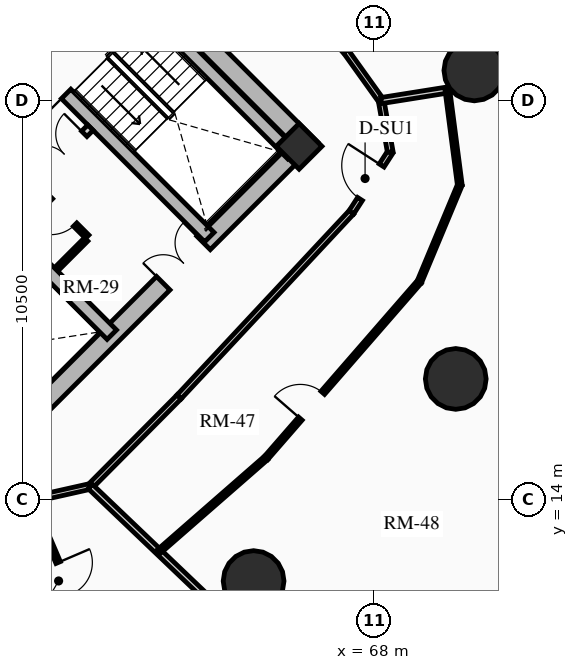
"""IFC4 building model, lengths in metres.
Left out: names, types, materials, properties, quantities, classifications, styles, units other than length and angle.
Written with IfcOpenShell. Run it as: python <this file> out.ifc"""

import sys

from ifc_helpers import new_model, si_unit, direction, frame, frame_2d, origin, origin_2d, place, context, subcontext, project, spatial, rectangle, circle, extrude, source, transform, mapped, element, fill, save


model = new_model("IFC4")
c1 = context("Model", 3, precision=1e-05, world=origin(), true_north=direction((0.0, 1.0)))
c2 = subcontext(c1, "Body", "Model", "MODEL_VIEW")
j1 = project(units=[si_unit("LENGTHUNIT", "METRE"), si_unit("PLANEANGLEUNIT", "RADIAN")], contexts=[c1])
p1 = place(None, origin())
s1 = spatial("IfcSite", under=j1, at=p1, CompositionType="ELEMENT")
p2 = place(p1, origin())
s2 = spatial("IfcBuilding", under=s1, at=p2, CompositionType="ELEMENT")
p3 = place(p2, frame((0.0, 0.0, 51.1)))
s3 = spatial("IfcBuildingStorey", under=s2, at=p3, CompositionType="ELEMENT", Elevation=51.1)
p4 = place(p3, frame((66.339, 23.227, 0.0), z_axis=(0.0, 0.0, 1.0), x_axis=(-0.707106781187, 0.707106781187, 0.0)))
e1 = element("IfcWall", 1, at=p4, inside=s3, PredefinedType="SHEAR", context=c2, shape_type="SweptSolid", body=[
    extrude(rectangle(XDim=14.3, YDim=0.5, at=frame_2d((7.15, 0.0))), origin(), (0.0, 0.0, 1.0), 2.91),
])
p5 = place(p3, frame((58.596, 15.838, 0.0), z_axis=(0.0, 0.0, 1.0), x_axis=(0.707106781187, 0.707106781187, 0.0)))
e2 = element("IfcWall", 2, at=p5, inside=s3, PredefinedType="SHEAR", context=c2, shape_type="SweptSolid", body=[
    extrude(rectangle(XDim=10.7, YDim=0.5, at=frame_2d((5.35, 0.0))), origin(), (0.0, 0.0, 1.0), 2.91),
])
m1 = source(origin(), c2, "Body", "SweptSolid", [
    extrude(rectangle(XDim=1.5, YDim=2.02, at=frame_2d((0.75, 1.01))), frame((0.0, 0.26, 0.0), z_axis=(0.0, -1.0, 0.0), x_axis=(1.0, 0.0, 0.0)), (0.0, 0.0, 1.0), 0.52),
])
p6 = place(p5, frame((5.45, 0.0, 0.0)))
e3 = element("IfcOpeningElement", 3, at=p6, cuts=e2, PredefinedType="OPENING", context=c2, shape_type="MappedRepresentation", body=[
    mapped(m1, transform((0.0, 0.0, 0.0), x_axis=(1.0, 0.0, 0.0), y_axis=(0.0, 1.0, 0.0), z_axis=(0.0, 0.0, 1.0), scale=1.0)),
])
p7 = place(p3, frame((61.096, 18.338, 0.0), z_axis=(0.0, 0.0, 1.0), x_axis=(-0.707106781187, 0.707106781187, 0.0)))
e4 = element("IfcWall", 4, at=p7, inside=s3, PredefinedType="SHEAR", context=c2, shape_type="SweptSolid", body=[
    extrude(rectangle(XDim=13.8, YDim=0.35, at=frame_2d((6.9, 0.0))), origin(), (0.0, 0.0, 1.0), 2.91),
])
m2 = source(origin(), c2, "Body", "SweptSolid", [
    extrude(rectangle(XDim=1.1, YDim=2.015, at=frame_2d((0.55, 1.007))), frame((0.0, 0.185, 0.0), z_axis=(0.0, -1.0, 0.0), x_axis=(1.0, 0.0, 0.0)), (0.0, 0.0, 1.0), 0.37),
])
p8 = place(p7, frame((4.9, 0.0, 0.0)))
e5 = element("IfcOpeningElement", 5, at=p8, cuts=e4, PredefinedType="OPENING", context=c2, shape_type="MappedRepresentation", body=[
    mapped(m2, transform((0.0, 0.0, 0.0), x_axis=(1.0, 0.0, 0.0), y_axis=(0.0, 1.0, 0.0), z_axis=(0.0, 0.0, 1.0), scale=1.0)),
])
m3 = source(origin(), c2, "Body", "SweptSolid", [
    extrude(rectangle(XDim=1.15, YDim=2.02, at=frame_2d((0.575, 1.01))), frame((0.0, 0.185, 0.0), z_axis=(0.0, -1.0, 0.0), x_axis=(1.0, 0.0, 0.0)), (0.0, 0.0, 1.0), 0.37),
])
p9 = place(p7, frame((7.32, 0.0, 0.0)))
e6 = element("IfcOpeningElement", 6, at=p9, cuts=e4, PredefinedType="OPENING", context=c2, shape_type="MappedRepresentation", body=[
    mapped(m3, transform((0.0, 0.0, 0.0), x_axis=(1.0, 0.0, 0.0), y_axis=(0.0, 1.0, 0.0), z_axis=(0.0, 0.0, 1.0), scale=1.0)),
])
p10 = place(p3, frame((63.662, 20.904, 0.0), z_axis=(0.0, 0.0, 1.0), x_axis=(-0.707106781187, 0.707106781187, 0.0)))
e7 = element("IfcWall", 7, at=p10, inside=s3, PredefinedType="SHEAR", context=c2, shape_type="SweptSolid", body=[
    extrude(rectangle(XDim=13.8, YDim=0.35, at=frame_2d((6.9, 0.0))), origin(), (0.0, 0.0, 1.0), 2.91),
])
p11 = place(p10, frame((10.025, 0.0, 0.0)))
e8 = element("IfcOpeningElement", 8, at=p11, cuts=e7, PredefinedType="OPENING", context=c2, shape_type="MappedRepresentation", body=[
    mapped(m2, transform((0.0, 0.0, 0.0), x_axis=(1.0, 0.0, 0.0), y_axis=(0.0, 1.0, 0.0), z_axis=(0.0, 0.0, 1.0), scale=1.0)),
])
p12 = place(p10, frame((12.025, 0.0, 0.0)))
e9 = element("IfcOpeningElement", 9, at=p12, cuts=e7, PredefinedType="OPENING", context=c2, shape_type="MappedRepresentation", body=[
    mapped(m2, transform((0.0, 0.0, 0.0), x_axis=(1.0, 0.0, 0.0), y_axis=(0.0, 1.0, 0.0), z_axis=(0.0, 0.0, 1.0), scale=1.0)),
])
p13 = place(p10, frame((5.33, 0.0, 0.0)))
e10 = element("IfcOpeningElement", 10, at=p13, cuts=e7, PredefinedType="OPENING", context=c2, shape_type="MappedRepresentation", body=[
    mapped(m3, transform((0.0, 0.0, 0.0), x_axis=(1.0, 0.0, 0.0), y_axis=(0.0, 1.0, 0.0), z_axis=(0.0, 0.0, 1.0), scale=1.0)),
])
p14 = place(p3, frame((65.847, 23.089, 0.0), z_axis=(0.0, 0.0, 1.0), x_axis=(-0.707106781187, 0.707106781187, 0.0)))
e11 = element("IfcWall", 11, at=p14, inside=s3, PredefinedType="SHEAR", context=c2, shape_type="SweptSolid", body=[
    extrude(rectangle(XDim=6.745, YDim=0.35, at=frame_2d((3.373, 0.0))), origin(), (0.0, 0.0, 1.0), 2.91),
])
p15 = place(p3, frame((58.893, 25.674, 0.0), z_axis=(0.0, 0.0, 1.0), x_axis=(0.707106781187, 0.707106781187, 0.0)))
e12 = element("IfcWall", 12, at=p15, inside=s3, PredefinedType="SHEAR", context=c2, shape_type="SweptSolid", body=[
    extrude(rectangle(XDim=3.285, YDim=0.35, at=frame_2d((1.643, 0.0))), origin(), (0.0, 0.0, 1.0), 2.91),
])
p16 = place(p3, frame((66.024, 23.294, 0.0), z_axis=(0.0, 0.0, 1.0), x_axis=(0.707106781187, 0.707106781187, 0.0)))
e13 = element("IfcColumn", 13, at=p16, inside=s3, PredefinedType="COLUMN", context=c2, shape_type="SweptSolid", body=[
    extrude(rectangle(XDim=0.85, YDim=0.85, at=origin_2d()), origin(), (0.0, 0.0, 1.0), 2.91),
])
for number, where, z_axis, x_axis in (
    (14, (64.827, 11.854, 0.0), (0.0, 0.0, 1.0), (1.0, 0.0, 0.0)),
    (15, (70.146, 17.173, 0.0), (0.0, 0.0, 1.0), (1.0, 0.0, 0.0)),
    (16, (70.635, 25.291, 0.0), (0.0, 0.0, 1.0), (1.0, 0.0, 0.0)),
):
    element("IfcColumn", number, at=place(p3, frame(where, z_axis=z_axis, x_axis=x_axis)), inside=s3, PredefinedType="USERDEFINED", context=c2, shape_type="SweptSolid", body=[
        extrude(circle(Radius=0.8, at=origin_2d()), origin(), (0.0, 0.0, 1.0), 2.91),
    ])
p17 = place(p3, frame((73.814, 15.031, 0.0), z_axis=(0.0, 0.0, 1.0), x_axis=(-0.559638693991, -0.828736708604, 0.0)))
e17 = element("IfcWall", 17, at=p17, inside=s3, PredefinedType="SOLIDWALL", context=c2, shape_type="SweptSolid", body=[
    extrude(rectangle(XDim=4.93, YDim=0.24, at=frame_2d((2.465, 0.0))), origin(), (0.0, 0.0, 1.0), 2.073),
])
m4 = source(origin(), c2, "Body", "SweptSolid", [
    extrude(rectangle(XDim=2.2, YDim=1.35, at=frame_2d((1.1, 0.675))), frame((0.0, 0.13, 0.0), z_axis=(0.0, -1.0, 0.0), x_axis=(1.0, 0.0, 0.0)), (0.0, 0.0, 1.0), 0.26),
])
p18 = place(p17, frame((1.365, 0.0, 0.65)))
e18 = element("IfcOpeningElement", 18, at=p18, cuts=e17, PredefinedType="OPENING", context=c2, shape_type="MappedRepresentation", body=[
    mapped(m4, transform((0.0, 0.0, 0.0), x_axis=(1.0, 0.0, 0.0), y_axis=(0.0, 1.0, 0.0), z_axis=(0.0, 0.0, 1.0), scale=1.0)),
])
p19 = place(p3, frame((58.214, 21.467, 0.0), z_axis=(0.0, 0.0, 1.0), x_axis=(0.707106781187, 0.707106781187, 0.0)))
e19 = element("IfcWall", 19, at=p19, inside=s3, PredefinedType="PARTITIONING", context=c2, shape_type="SweptSolid", body=[
    extrude(rectangle(XDim=3.28, YDim=0.2, at=frame_2d((1.64, 0.0))), origin(), (0.0, 0.0, 1.0), 2.635),
])
m5 = source(origin(), c2, "Body", "SweptSolid", [
    extrude(rectangle(XDim=1.5, YDim=2.02, at=frame_2d((0.75, 1.01))), frame((0.0, 0.11, 0.0), z_axis=(0.0, -1.0, 0.0), x_axis=(1.0, 0.0, 0.0)), (0.0, 0.0, 1.0), 0.22),
])
p20 = place(p19, frame((1.55, 0.0, 0.0)))
e20 = element("IfcOpeningElement", 20, at=p20, cuts=e19, PredefinedType="OPENING", context=c2, shape_type="MappedRepresentation", body=[
    mapped(m5, transform((0.0, 0.0, 0.0), x_axis=(1.0, 0.0, 0.0), y_axis=(0.0, 1.0, 0.0), z_axis=(0.0, 0.0, 1.0), scale=1.0)),
])
p21 = place(p3, frame((60.448, 20.915, 0.0), z_axis=(0.0, 0.0, 1.0), x_axis=(-0.707106781187, 0.707106781187, 0.0)))
e21 = element("IfcWall", 21, at=p21, inside=s3, PredefinedType="PARTITIONING", context=c2, shape_type="SweptSolid", body=[
    extrude(rectangle(XDim=1.87, YDim=0.125, at=frame_2d((0.935, 0.0))), origin(), (0.0, 0.0, 1.0), 2.635),
])
m6 = source(origin(), c2, "Body", "SweptSolid", [
    extrude(rectangle(XDim=0.9, YDim=2.005, at=frame_2d((0.45, 1.002))), frame((0.0, 0.073, 0.0), z_axis=(0.0, -1.0, 0.0), x_axis=(1.0, 0.0, 0.0)), (0.0, 0.0, 1.0), 0.145),
])
p22 = place(p21, frame((0.45, 0.0, 0.0)))
e22 = element("IfcOpeningElement", 22, at=p22, cuts=e21, PredefinedType="OPENING", context=c2, shape_type="MappedRepresentation", body=[
    mapped(m6, transform((0.0, 0.0, 0.0), x_axis=(1.0, 0.0, 0.0), y_axis=(0.0, 1.0, 0.0), z_axis=(0.0, 0.0, 1.0), scale=1.0)),
])
p23 = place(p3, frame((59.643, 20.066, 0.0), z_axis=(0.0, 0.0, 1.0), x_axis=(0.707106781187, 0.707106781187, 0.0)))
e23 = element("IfcWall", 23, at=p23, inside=s3, PredefinedType="PARTITIONING", context=c2, shape_type="SweptSolid", body=[
    extrude(rectangle(XDim=1.1, YDim=0.125, at=frame_2d((0.55, 0.0))), origin(), (0.0, 0.0, 1.0), 2.635),
])
p24 = place(p3, frame((58.975, 13.996, 0.0), z_axis=(0.0, 0.0, 1.0), x_axis=(0.975700857392, 0.219106907431, 0.0)))
e24 = element("IfcWall", 24, at=p24, inside=s3, PredefinedType="PARTITIONING", context=c2, shape_type="SweptSolid", body=[
    extrude(rectangle(XDim=1.591, YDim=0.15, at=frame_2d((0.795, 0.0))), origin(), (0.0, 0.0, 1.0), 2.205),
])
p25 = place(p3, frame((60.528, 14.344, 0.0), z_axis=(0.0, 0.0, 1.0), x_axis=(0.704381645997, 0.709821454158, 0.0)))
e25 = element("IfcWall", 25, at=p25, inside=s3, PredefinedType="PARTITIONING", context=c2, shape_type="SweptSolid", body=[
    extrude(rectangle(XDim=3.321, YDim=0.15, at=frame_2d((1.661, 0.0))), origin(), (0.0, 0.0, 1.0), 2.159),
])
p26 = place(p3, frame((62.867, 16.702, 0.0), z_axis=(0.0, 0.0, 1.0), x_axis=(0.682449206191, 0.73093302085, 0.0)))
e26 = element("IfcWall", 26, at=p26, inside=s3, PredefinedType="PARTITIONING", context=c2, shape_type="SweptSolid", body=[
    extrude(rectangle(XDim=6.642, YDim=0.15, at=frame_2d((3.321, 0.0))), origin(), (0.0, 0.0, 1.0), 2.159),
])
p27 = place(p3, frame((67.4, 21.556, 0.0), z_axis=(0.0, 0.0, 1.0), x_axis=(0.542247692187, 0.840218686009, 0.0)))
e27 = element("IfcWall", 27, at=p27, inside=s3, PredefinedType="PARTITIONING", context=c2, shape_type="SweptSolid", body=[
    extrude(rectangle(XDim=1.887, YDim=0.15, at=frame_2d((0.943, 0.0))), origin(), (0.0, 0.0, 1.0), 2.205),
])
m7 = source(origin(), c2, "Body", "SweptSolid", [
    extrude(rectangle(XDim=1.05, YDim=2.015, at=frame_2d((0.525, 1.007))), frame((0.0, 0.085, 0.0), z_axis=(0.0, -1.0, 0.0), x_axis=(1.0, 0.0, 0.0)), (0.0, 0.0, 1.0), 0.17),
])
p28 = place(p27, frame((0.419, 0.0, 0.0)))
e28 = element("IfcOpeningElement", 28, at=p28, cuts=e27, PredefinedType="OPENING", context=c2, shape_type="MappedRepresentation", body=[
    mapped(m7, transform((0.0, 0.0, 0.0), x_axis=(1.0, 0.0, 0.0), y_axis=(0.0, 1.0, 0.0), z_axis=(0.0, 0.0, 1.0), scale=1.0)),
])
p29 = place(p3, frame((68.423, 23.142, 0.0), z_axis=(0.0, 0.0, 1.0), x_axis=(-0.174796562349, 0.984604571283, 0.0)))
e29 = element("IfcWall", 29, at=p29, inside=s3, PredefinedType="PARTITIONING", context=c2, shape_type="SweptSolid", body=[
    extrude(rectangle(XDim=1.377, YDim=0.15, at=frame_2d((0.688, 0.0))), origin(), (0.0, 0.0, 1.0), 2.159),
])
p30 = place(p3, frame((68.182, 24.498, 0.0), z_axis=(0.0, 0.0, 1.0), x_axis=(-0.582532339525, 0.812807525437, 0.0)))
e30 = element("IfcWall", 30, at=p30, inside=s3, PredefinedType="PARTITIONING", context=c2, shape_type="SweptSolid", body=[
    extrude(rectangle(XDim=1.605, YDim=0.15, at=frame_2d((0.803, 0.0))), origin(), (0.0, 0.0, 1.0), 2.205),
])
p31 = place(p3, frame((67.247, 25.802, 0.0), z_axis=(0.0, 0.0, 1.0), x_axis=(-0.696771261687, 0.71729339108, 0.0)))
e31 = element("IfcWall", 31, at=p31, inside=s3, PredefinedType="PARTITIONING", context=c2, shape_type="SweptSolid", body=[
    extrude(rectangle(XDim=5.972, YDim=0.15, at=frame_2d((2.986, 0.0))), origin(), (0.0, 0.0, 1.0), 2.635),
])
m8 = source(origin(), c2, "Body", "SweptSolid", [
    extrude(rectangle(XDim=1.0, YDim=2.015, at=frame_2d((0.5, 1.007))), frame((0.0, 0.085, 0.0), z_axis=(0.0, -1.0, 0.0), x_axis=(1.0, 0.0, 0.0)), (0.0, 0.0, 1.0), 0.17),
])
p32 = place(p31, frame((2.486, 0.0, 0.0)))
e32 = element("IfcOpeningElement", 32, at=p32, cuts=e31, PredefinedType="OPENING", context=c2, shape_type="MappedRepresentation", body=[
    mapped(m8, transform((0.0, 0.0, 0.0), x_axis=(1.0, 0.0, 0.0), y_axis=(0.0, 1.0, 0.0), z_axis=(0.0, 0.0, 1.0), scale=1.0)),
])
p33 = place(p3, frame((60.528, 14.344, 0.0), z_axis=(0.0, 0.0, 1.0), x_axis=(0.723320016743, -0.690512963947, 0.0)))
e33 = element("IfcWall", 33, at=p33, inside=s3, PredefinedType="PARTITIONING", context=c2, shape_type="SweptSolid", body=[
    extrude(rectangle(XDim=8.893, YDim=0.16, at=frame_2d((4.446, 0.0))), origin(), (0.0, 0.0, 1.0), 2.073),
])
p34 = place(p3, frame((68.182, 24.498, 0.0), z_axis=(0.0, 0.0, 1.0), x_axis=(0.987550107246, 0.157304754152, 0.0)))
e34 = element("IfcWall", 34, at=p34, inside=s3, PredefinedType="PARTITIONING", context=c2, shape_type="SweptSolid", body=[
    extrude(rectangle(XDim=6.304, YDim=0.16, at=frame_2d((3.152, 0.0))), origin(), (0.0, 0.0, 1.0), 2.073),
])
p35 = place(p3, frame((58.975, 13.996, 0.0), z_axis=(0.0, 0.0, 1.0), x_axis=(0.393755664375, -0.919215141723, 0.0)))
e35 = element("IfcWall", 35, at=p35, inside=s3, PredefinedType="PARTITIONING", context=c2, shape_type="SweptSolid", body=[
    extrude(rectangle(XDim=7.563, YDim=0.125, at=frame_2d((3.782, 0.0))), origin(), (0.0, 0.0, 1.0), 2.073),
])
p36 = place(p35, frame((1.8, 0.0, 0.0)))
e36 = element("IfcOpeningElement", 36, at=p36, cuts=e35, PredefinedType="OPENING", context=c2, shape_type="MappedRepresentation", body=[
    mapped(m6, transform((0.0, 0.0, 0.0), x_axis=(1.0, 0.0, 0.0), y_axis=(0.0, 1.0, 0.0), z_axis=(0.0, 0.0, 1.0), scale=1.0)),
])
p37 = place(p3, frame((62.329, 12.625, 0.0), z_axis=(0.0, 0.0, 1.0), x_axis=(0.753237140985, 0.657749047465, 0.0)))
e37 = element("IfcWall", 37, at=p37, inside=s3, PredefinedType="PARTITIONING", context=c2, shape_type="SweptSolid", body=[
    extrude(rectangle(XDim=3.753, YDim=0.125, at=frame_2d((1.877, 0.0))), origin(), (0.0, 0.0, 1.0), 2.159),
])
p38 = place(p3, frame((65.156, 15.094, 0.0), z_axis=(0.0, 0.0, 1.0), x_axis=(0.656356662483, 0.754450748302, 0.0)))
e38 = element("IfcWall", 38, at=p38, inside=s3, PredefinedType="PARTITIONING", context=c2, shape_type="SweptSolid", body=[
    extrude(rectangle(XDim=6.147, YDim=0.125, at=frame_2d((3.074, 0.0))), origin(), (0.0, 0.0, 1.0), 2.159),
])
p39 = place(p38, frame((1.372, 0.0, 0.0)))
e39 = element("IfcOpeningElement", 39, at=p39, cuts=e38, PredefinedType="OPENING", context=c2, shape_type="MappedRepresentation", body=[
    mapped(m6, transform((0.0, 0.0, 0.0), x_axis=(1.0, 0.0, 0.0), y_axis=(0.0, 1.0, 0.0), z_axis=(0.0, 0.0, 1.0), scale=1.0)),
])
p40 = place(p3, frame((69.191, 19.732, 0.0), z_axis=(0.0, 0.0, 1.0), x_axis=(0.385156247749, 0.922851377427, 0.0)))
e40 = element("IfcWall", 40, at=p40, inside=s3, PredefinedType="PARTITIONING", context=c2, shape_type="SweptSolid", body=[
    extrude(rectangle(XDim=2.756, YDim=0.125, at=frame_2d((1.378, 0.0))), origin(), (0.0, 0.0, 1.0), 2.205),
])
p41 = place(p3, frame((70.252, 22.275, 0.0), z_axis=(0.0, 0.0, 1.0), x_axis=(-0.129645482902, 0.991560411051, 0.0)))
e41 = element("IfcWall", 41, at=p41, inside=s3, PredefinedType="PARTITIONING", context=c2, shape_type="SweptSolid", body=[
    extrude(rectangle(XDim=2.521, YDim=0.125, at=frame_2d((1.261, 0.0))), origin(), (0.0, 0.0, 1.0), 2.635),
])
m9 = source(origin(), c2, "Body", "SweptSolid", [
    extrude(rectangle(XDim=1.15, YDim=2.02, at=frame_2d((0.575, 1.01))), frame((0.0, 0.025, 0.0), z_axis=(0.0, -1.0, 0.0), x_axis=(1.0, 0.0, 0.0)), (0.0, 0.0, 1.0), 0.05),
])
p42 = place(p13, origin())
e42 = element("IfcDoor", 42, at=p42, inside=s3, OperationType="SINGLE_SWING_LEFT", PredefinedType="DOOR", context=c2, shape_type="MappedRepresentation", body=[
    mapped(m9, transform((0.0, 0.0, 0.0), x_axis=(1.0, 0.0, 0.0), y_axis=(0.0, 1.0, 0.0), z_axis=(0.0, 0.0, 1.0), scale=1.0)),
])
fill(e10, e42)
m10 = source(origin(), c2, "Body", "SweptSolid", [
    extrude(rectangle(XDim=1.5, YDim=2.02, at=frame_2d((0.75, 1.01))), frame((0.0, 0.025, 0.0), z_axis=(0.0, -1.0, 0.0), x_axis=(1.0, 0.0, 0.0)), (0.0, 0.0, 1.0), 0.05),
])
p43 = place(p6, origin())
e43 = element("IfcDoor", 43, at=p43, inside=s3, OperationType="DOUBLE_DOOR_SINGLE_SWING", PredefinedType="DOOR", context=c2, shape_type="MappedRepresentation", body=[
    mapped(m10, transform((0.0, 0.0, 0.0), x_axis=(1.0, 0.0, 0.0), y_axis=(0.0, 1.0, 0.0), z_axis=(0.0, 0.0, 1.0), scale=1.0)),
])
fill(e3, e43)
p44 = place(p20, origin())
e44 = element("IfcDoor", 44, at=p44, inside=s3, OperationType="DOUBLE_DOOR_SINGLE_SWING", PredefinedType="DOOR", context=c2, shape_type="MappedRepresentation", body=[
    mapped(m10, transform((0.0, 0.0, 0.0), x_axis=(1.0, 0.0, 0.0), y_axis=(0.0, 1.0, 0.0), z_axis=(0.0, 0.0, 1.0), scale=1.0)),
])
fill(e20, e44)
m11 = source(origin(), c2, "Body", "SweptSolid", [
    extrude(rectangle(XDim=0.9, YDim=2.005, at=frame_2d((0.45, 1.002))), frame((0.0, 0.025, 0.0), z_axis=(0.0, -1.0, 0.0), x_axis=(1.0, 0.0, 0.0)), (0.0, 0.0, 1.0), 0.05),
])
p45 = place(p22, origin())
e45 = element("IfcDoor", 45, at=p45, inside=s3, OperationType="SINGLE_SWING_RIGHT", PredefinedType="DOOR", context=c2, shape_type="MappedRepresentation", body=[
    mapped(m11, transform((0.0, 0.0, 0.0), x_axis=(1.0, 0.0, 0.0), y_axis=(0.0, 1.0, 0.0), z_axis=(0.0, 0.0, 1.0), scale=1.0)),
])
fill(e22, e45)
p46 = place(p36, origin())
e46 = element("IfcDoor", 46, at=p46, inside=s3, OperationType="SINGLE_SWING_LEFT", PredefinedType="DOOR", context=c2, shape_type="MappedRepresentation", body=[
    mapped(m11, transform((0.0, 0.0, 0.0), x_axis=(1.0, 0.0, 0.0), y_axis=(0.0, 1.0, 0.0), z_axis=(0.0, 0.0, 1.0), scale=1.0)),
])
fill(e36, e46)
m12 = source(origin(), c2, "Body", "SweptSolid", [
    extrude(rectangle(XDim=1.05, YDim=2.015, at=frame_2d((0.525, 1.007))), frame((0.0, 0.025, 0.0), z_axis=(0.0, -1.0, 0.0), x_axis=(1.0, 0.0, 0.0)), (0.0, 0.0, 1.0), 0.05),
])
p47 = place(p28, origin())
e47 = element("IfcDoor", 47, at=p47, inside=s3, OperationType="SINGLE_SWING_RIGHT", PredefinedType="DOOR", context=c2, shape_type="MappedRepresentation", body=[
    mapped(m12, transform((0.0, 0.0, 0.0), x_axis=(1.0, 0.0, 0.0), y_axis=(0.0, 1.0, 0.0), z_axis=(0.0, 0.0, 1.0), scale=1.0)),
])
fill(e28, e47)
p48 = place(p39, origin())
e48 = element("IfcDoor", 48, at=p48, inside=s3, OperationType="SINGLE_SWING_LEFT", PredefinedType="DOOR", context=c2, shape_type="MappedRepresentation", body=[
    mapped(m11, transform((0.0, 0.0, 0.0), x_axis=(1.0, 0.0, 0.0), y_axis=(0.0, 1.0, 0.0), z_axis=(0.0, 0.0, 1.0), scale=1.0)),
])
fill(e39, e48)
save(model, sys.argv[1])
